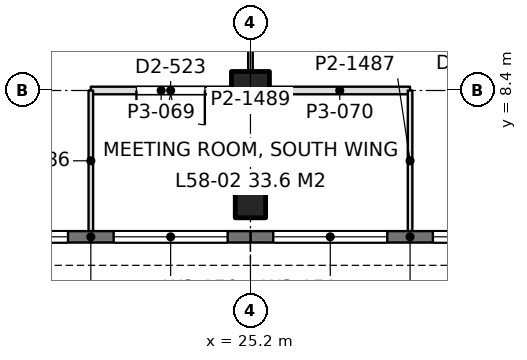
"""IFC4 building model, lengths in metres.
Left out: names, types, materials, properties, quantities, classifications, styles, units other than length and angle.
Written with IfcOpenShell. Run it as: python <this file> out.ifc"""

import sys

from ifc_helpers import new_model, si_unit, direction, frame, frame_2d, origin, origin_2d, place, context, subcontext, project, spatial, rectangle, extrude, element, fill, save


model = new_model("IFC4")
c1 = context("Model", 3, precision=1e-05, world=origin(), true_north=direction((0.0, 1.0)))
c2 = subcontext(c1, "Body", "Model", "MODEL_VIEW")
j1 = project(units=[si_unit("LENGTHUNIT", "METRE"), si_unit("PLANEANGLEUNIT", "RADIAN")], contexts=[c1])
p1 = place(None, origin())
s1 = spatial("IfcSite", under=j1, at=p1, CompositionType="ELEMENT")
p2 = place(p1, origin())
s2 = spatial("IfcBuilding", under=s1, at=p2, CompositionType="ELEMENT")
p3 = place(p2, frame((0.0, 0.0, 254.7)))
s3 = spatial("IfcBuildingStorey", under=s2, at=p3, CompositionType="ELEMENT", Elevation=254.7)
p4 = place(p3, frame((25.2, 5.6, 0.0), z_axis=(0.0, 0.0, 1.0), x_axis=(1.0, 0.0, 0.0)))
e1 = element("IfcColumn", 1, at=p4, inside=s3, PredefinedType="COLUMN", context=c2, shape_type="SweptSolid", body=[
    extrude(rectangle(XDim=0.8, YDim=1.1, at=origin_2d()), origin(), (0.0, 0.0, 1.0), 4.5),
])
p5 = place(p3, frame((25.2, 8.4, 0.0), z_axis=(0.0, 0.0, 1.0), x_axis=(1.0, 0.0, 0.0)))
e2 = element("IfcColumn", 2, at=p5, inside=s3, PredefinedType="COLUMN", context=c2, shape_type="SweptSolid", body=[
    extrude(rectangle(XDim=1.0, YDim=1.0, at=origin_2d()), origin(), (0.0, 0.0, 1.0), 4.5),
])
p6 = place(p3, frame((33.6, 4.55, 0.0), z_axis=(0.0, 0.0, 1.0), x_axis=(-1.0, 0.0, 0.0)))
e3 = element("IfcWall", 3, at=p6, inside=s3, PredefinedType="SOLIDWALL", context=c2, shape_type="SweptSolid", body=[
    extrude(rectangle(XDim=8.4, YDim=0.3, at=frame_2d((4.2, 0.0))), origin(), (0.0, 0.0, 1.0), 4.35),
])
p7 = place(p6, frame((0.6, 0.0, 0.9)))
e4 = element("IfcOpeningElement", 4, at=p7, cuts=e3, PredefinedType="OPENING", context=c2, shape_type="SweptSolid", body=[
    extrude(rectangle(XDim=3.0, YDim=2.4, at=frame_2d((1.5, 1.2))), frame((0.0, 0.16, 0.0), z_axis=(0.0, -1.0, 0.0), x_axis=(1.0, 0.0, 0.0)), (0.0, 0.0, 1.0), 0.32),
])
p8 = place(p6, frame((4.8, 0.0, 0.9)))
e5 = element("IfcOpeningElement", 5, at=p8, cuts=e3, PredefinedType="OPENING", context=c2, shape_type="SweptSolid", body=[
    extrude(rectangle(XDim=3.0, YDim=2.4, at=frame_2d((1.5, 1.2))), frame((0.0, 0.16, 0.0), z_axis=(0.0, -1.0, 0.0), x_axis=(1.0, 0.0, 0.0)), (0.0, 0.0, 1.0), 0.32),
])
p9 = place(p3, frame((25.2, 4.55, 0.0), z_axis=(0.0, 0.0, 1.0), x_axis=(-1.0, 0.0, 0.0)))
e6 = element("IfcWall", 6, at=p9, inside=s3, PredefinedType="SOLIDWALL", context=c2, shape_type="SweptSolid", body=[
    extrude(rectangle(XDim=8.4, YDim=0.3, at=frame_2d((4.2, 0.0))), origin(), (0.0, 0.0, 1.0), 4.35),
])
p10 = place(p9, frame((0.6, 0.0, 0.9)))
e7 = element("IfcOpeningElement", 7, at=p10, cuts=e6, PredefinedType="OPENING", context=c2, shape_type="SweptSolid", body=[
    extrude(rectangle(XDim=3.0, YDim=2.4, at=frame_2d((1.5, 1.2))), frame((0.0, 0.16, 0.0), z_axis=(0.0, -1.0, 0.0), x_axis=(1.0, 0.0, 0.0)), (0.0, 0.0, 1.0), 0.32),
])
p11 = place(p9, frame((4.8, 0.0, 0.9)))
e8 = element("IfcOpeningElement", 8, at=p11, cuts=e6, PredefinedType="OPENING", context=c2, shape_type="SweptSolid", body=[
    extrude(rectangle(XDim=3.0, YDim=2.4, at=frame_2d((1.5, 1.2))), frame((0.0, 0.16, 0.0), z_axis=(0.0, -1.0, 0.0), x_axis=(1.0, 0.0, 0.0)), (0.0, 0.0, 1.0), 0.32),
])
p12 = place(p3, frame((21.0, 8.4, 0.0), z_axis=(0.0, 0.0, 1.0), x_axis=(1.0, 0.0, 0.0)))
e9 = element("IfcWall", 9, at=p12, inside=s3, PredefinedType="PARTITIONING", context=c2, shape_type="SweptSolid", body=[
    extrude(rectangle(XDim=3.701, YDim=0.2, at=frame_2d((1.851, 0.0))), origin(), (0.0, 0.0, 1.0), 3.8),
])
p13 = place(p12, frame((1.2, 0.0, 0.0)))
e10 = element("IfcOpeningElement", 10, at=p13, cuts=e9, PredefinedType="OPENING", context=c2, shape_type="SweptSolid", body=[
    extrude(rectangle(XDim=1.8, YDim=2.2, at=frame_2d((0.9, 1.1))), frame((0.0, 0.11, 0.0), z_axis=(0.0, -1.0, 0.0), x_axis=(1.0, 0.0, 0.0)), (0.0, 0.0, 1.0), 0.22),
])
p14 = place(p3, frame((25.699, 8.4, 0.0), z_axis=(0.0, 0.0, 1.0), x_axis=(1.0, 0.0, 0.0)))
e11 = element("IfcWall", 11, at=p14, inside=s3, PredefinedType="PARTITIONING", context=c2, shape_type="SweptSolid", body=[
    extrude(rectangle(XDim=3.701, YDim=0.2, at=frame_2d((1.851, 0.0))), origin(), (0.0, 0.0, 1.0), 3.8),
])
for number, where, z_axis, x_axis in (
    (12, (21.0, 4.7, 0.0), (0.0, 0.0, 1.0), (0.0, 1.0, 0.0)),
    (13, (29.4, 4.7, 0.0), (0.0, 0.0, 1.0), (0.0, 1.0, 0.0)),
):
    element("IfcWall", number, at=place(p3, frame(where, z_axis=z_axis, x_axis=x_axis)), inside=s3, PredefinedType="PARTITIONING", context=c2, shape_type="SweptSolid", body=[
        extrude(rectangle(XDim=3.7, YDim=0.12, at=frame_2d((1.85, 0.0))), origin(), (0.0, 0.0, 1.0), 3.8),
    ])
p15 = place(p3, frame((25.2, 8.899, 0.0), z_axis=(0.0, 0.0, 1.0), x_axis=(0.0, 1.0, 0.0)))
e14 = element("IfcWall", 14, at=p15, inside=s3, PredefinedType="PARTITIONING", context=c2, shape_type="SweptSolid", body=[
    extrude(rectangle(XDim=1.703, YDim=0.12, at=frame_2d((0.852, 0.0))), origin(), (0.0, 0.0, 1.0), 3.8),
])
p16 = place(p7, origin())
e15 = element("IfcWindow", 15, at=p16, inside=s3, PartitioningType="SINGLE_PANEL", PredefinedType="WINDOW", context=c2, shape_type="SweptSolid", body=[
    extrude(rectangle(XDim=3.0, YDim=2.4, at=frame_2d((1.5, 1.2))), frame((0.0, 0.03, 0.0), z_axis=(0.0, -1.0, 0.0), x_axis=(1.0, 0.0, 0.0)), (0.0, 0.0, 1.0), 0.06),
])
fill(e4, e15)
p17 = place(p8, origin())
e16 = element("IfcWindow", 16, at=p17, inside=s3, PartitioningType="SINGLE_PANEL", PredefinedType="WINDOW", context=c2, shape_type="SweptSolid", body=[
    extrude(rectangle(XDim=3.0, YDim=2.4, at=frame_2d((1.5, 1.2))), frame((0.0, 0.03, 0.0), z_axis=(0.0, -1.0, 0.0), x_axis=(1.0, 0.0, 0.0)), (0.0, 0.0, 1.0), 0.06),
])
fill(e5, e16)
p18 = place(p10, origin())
e17 = element("IfcWindow", 17, at=p18, inside=s3, PartitioningType="SINGLE_PANEL", PredefinedType="WINDOW", context=c2, shape_type="SweptSolid", body=[
    extrude(rectangle(XDim=3.0, YDim=2.4, at=frame_2d((1.5, 1.2))), frame((0.0, 0.03, 0.0), z_axis=(0.0, -1.0, 0.0), x_axis=(1.0, 0.0, 0.0)), (0.0, 0.0, 1.0), 0.06),
])
fill(e7, e17)
p19 = place(p11, origin())
e18 = element("IfcWindow", 18, at=p19, inside=s3, PartitioningType="SINGLE_PANEL", PredefinedType="WINDOW", context=c2, shape_type="SweptSolid", body=[
    extrude(rectangle(XDim=3.0, YDim=2.4, at=frame_2d((1.5, 1.2))), frame((0.0, 0.03, 0.0), z_axis=(0.0, -1.0, 0.0), x_axis=(1.0, 0.0, 0.0)), (0.0, 0.0, 1.0), 0.06),
])
fill(e8, e18)
p20 = place(p13, frame((1.8, 0.0, 0.0), z_axis=(0.0, 0.0, 1.0), x_axis=(-1.0, 0.0, 0.0)))
e19 = element("IfcDoor", 19, at=p20, inside=s3, OperationType="DOUBLE_DOOR_SINGLE_SWING", PredefinedType="DOOR", context=c2, shape_type="SweptSolid", body=[
    extrude(rectangle(XDim=1.8, YDim=2.2, at=frame_2d((0.9, 1.1))), frame((0.0, 0.025, 0.0), z_axis=(0.0, -1.0, 0.0), x_axis=(1.0, 0.0, 0.0)), (0.0, 0.0, 1.0), 0.05),
])
fill(e10, e19)
save(model, sys.argv[1])
